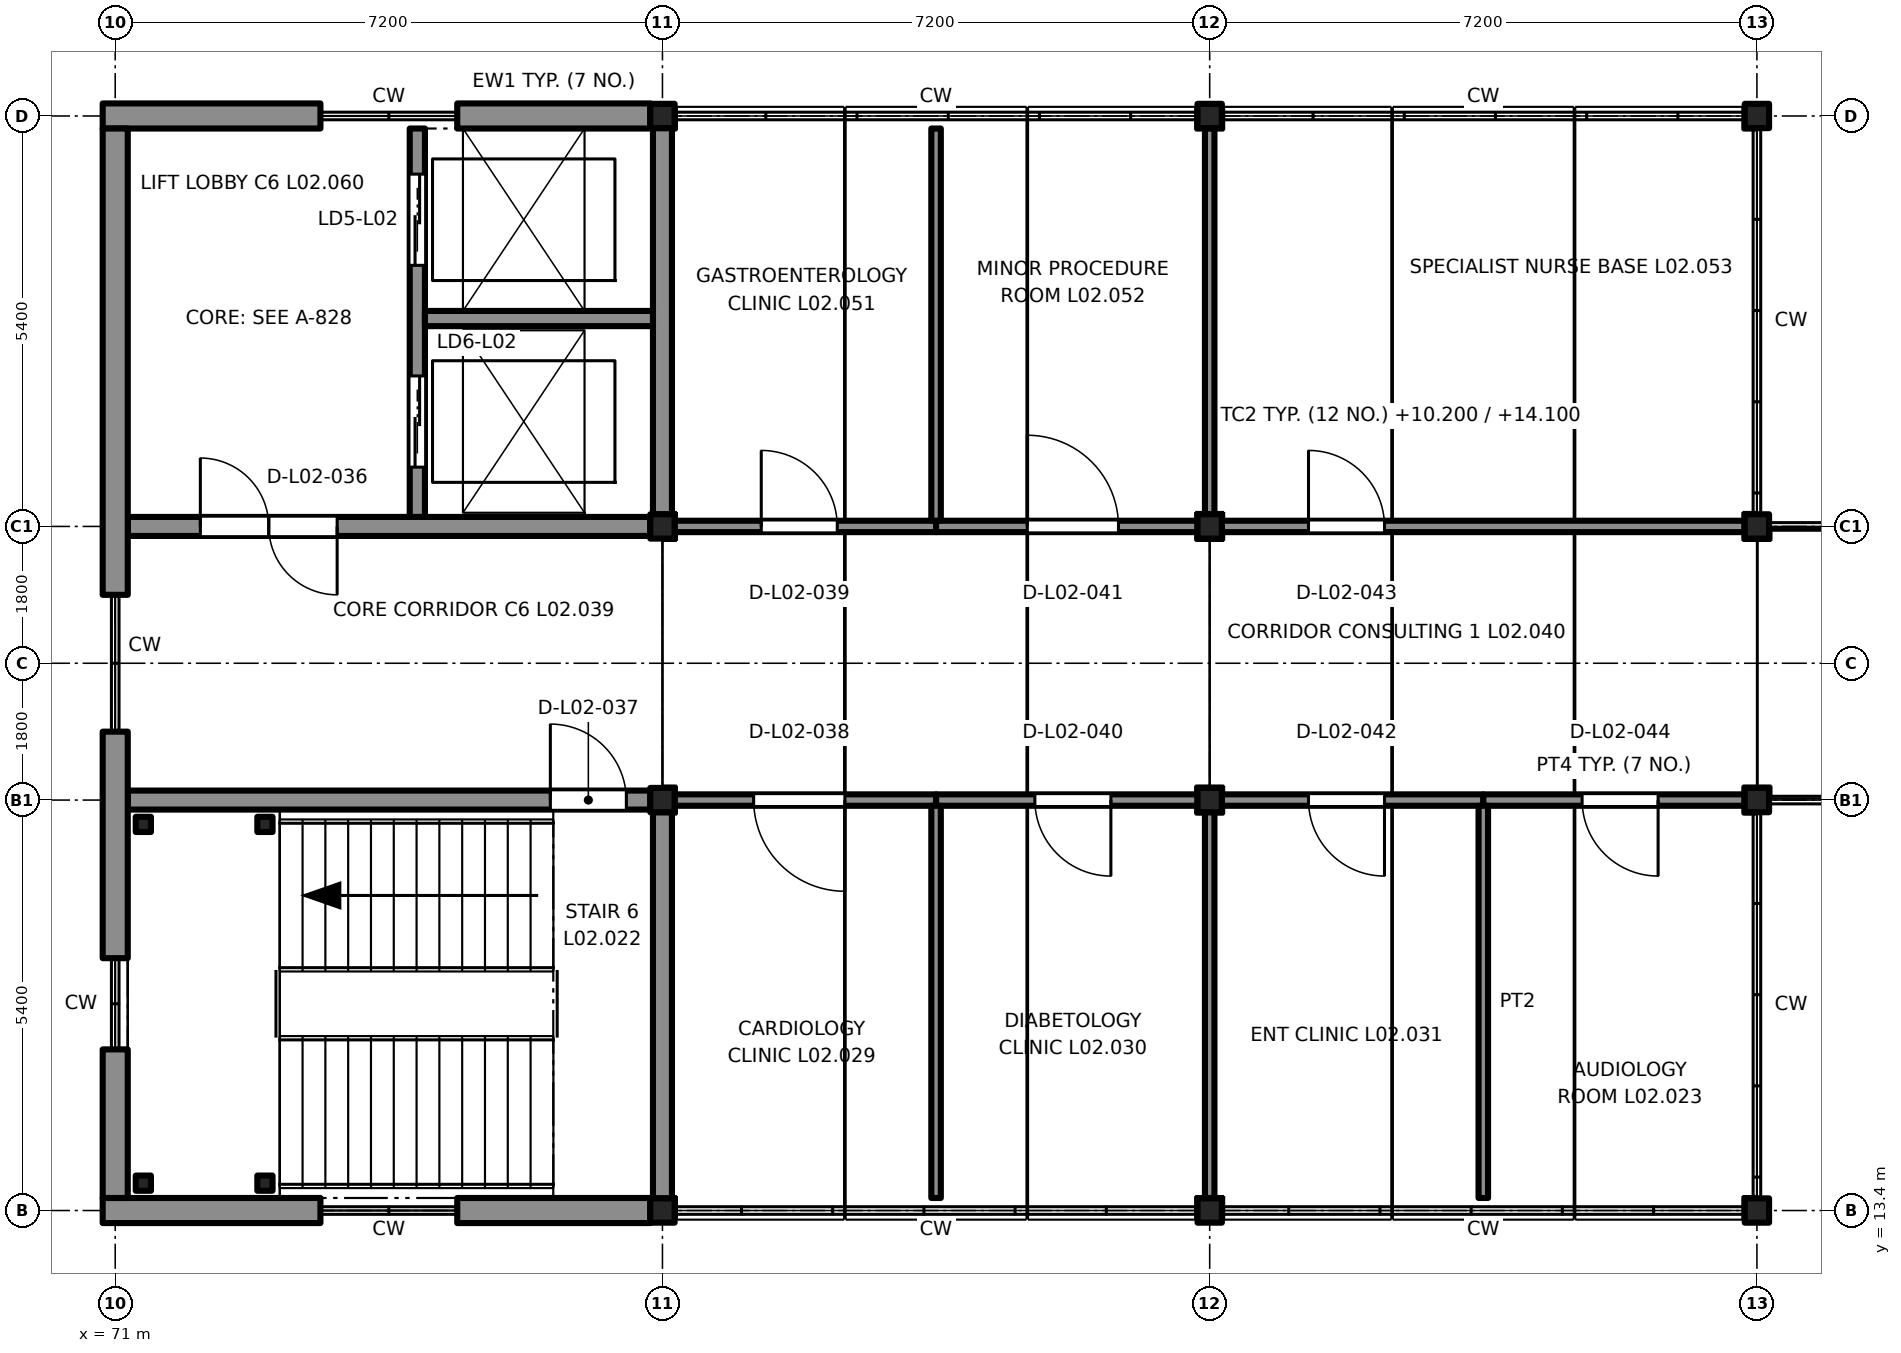
"""IFC4 building model, lengths in metres.
Left out: names, types, materials, properties, quantities, classifications, styles, units other than length and angle.
Written with IfcOpenShell. Run it as: python <this file> out.ifc"""

import sys

from ifc_helpers import new_model, si_unit, direction, frame, frame_2d, origin, origin_2d, place, context, subcontext, project, spatial, rectangle, extrude, element, fill, save


model = new_model("IFC4")
c1 = context("Model", 3, precision=1e-05, world=origin(), true_north=direction((0.0, 1.0)))
c2 = subcontext(c1, "Body", "Model", "MODEL_VIEW")
j1 = project(units=[si_unit("LENGTHUNIT", "METRE"), si_unit("PLANEANGLEUNIT", "RADIAN")], contexts=[c1])
p1 = place(None, origin())
s1 = spatial("IfcSite", under=j1, at=p1, CompositionType="ELEMENT")
p2 = place(p1, origin())
s2 = spatial("IfcBuilding", under=s1, at=p2, CompositionType="ELEMENT")
p3 = place(p2, frame((0.0, 0.0, 10.2)))
s3 = spatial("IfcBuildingStorey", under=s2, at=p3, CompositionType="ELEMENT", Elevation=10.2)
for number, where, z_axis, x_axis in (
    (1, (78.2, 13.4, 0.0), (0.0, 0.0, 1.0), (1.0, 0.0, 0.0)),
    (2, (78.2, 18.8, 0.0), (0.0, 0.0, 1.0), (1.0, 0.0, 0.0)),
    (3, (78.2, 22.4, 0.0), (0.0, 0.0, 1.0), (1.0, 0.0, 0.0)),
    (4, (78.2, 27.8, 0.0), (0.0, 0.0, 1.0), (1.0, 0.0, 0.0)),
    (5, (85.4, 13.4, 0.0), (0.0, 0.0, 1.0), (1.0, 0.0, 0.0)),
    (6, (85.4, 18.8, 0.0), (0.0, 0.0, 1.0), (1.0, 0.0, 0.0)),
    (7, (85.4, 22.4, 0.0), (0.0, 0.0, 1.0), (1.0, 0.0, 0.0)),
    (8, (85.4, 27.8, 0.0), (0.0, 0.0, 1.0), (1.0, 0.0, 0.0)),
    (9, (92.6, 13.4, 0.0), (0.0, 0.0, 1.0), (1.0, 0.0, 0.0)),
    (10, (92.6, 18.8, 0.0), (0.0, 0.0, 1.0), (1.0, 0.0, 0.0)),
    (11, (92.6, 22.4, 0.0), (0.0, 0.0, 1.0), (1.0, 0.0, 0.0)),
    (12, (92.6, 27.8, 0.0), (0.0, 0.0, 1.0), (1.0, 0.0, 0.0)),
):
    element("IfcColumn", number, at=place(p3, frame(where, z_axis=z_axis, x_axis=x_axis)), inside=s3, PredefinedType="COLUMN", context=c2, shape_type="SweptSolid", body=[
        extrude(rectangle(XDim=0.32, YDim=0.32, at=origin_2d()), origin(), (0.0, 0.0, 1.0), 3.9),
    ])
p4 = place(p3, frame((71.165, 18.8, 0.0), z_axis=(0.0, 0.0, 1.0), x_axis=(1.0, 0.0, 0.0)))
e13 = element("IfcWall", 13, at=p4, inside=s3, PredefinedType="SHEAR", context=c2, shape_type="SweptSolid", body=[
    extrude(rectangle(XDim=6.875, YDim=0.25, at=frame_2d((3.438, 0.0))), origin(), (0.0, 0.0, 1.0), 3.65),
])
p5 = place(p4, frame((5.56, 0.0, 0.0)))
e14 = element("IfcOpeningElement", 14, at=p5, cuts=e13, PredefinedType="OPENING", context=c2, shape_type="SweptSolid", body=[
    extrude(rectangle(XDim=1.0, YDim=2.1, at=frame_2d((0.5, 1.05))), frame((0.0, 0.135, 0.0), z_axis=(0.0, -1.0, 0.0), x_axis=(1.0, 0.0, 0.0)), (0.0, 0.0, 1.0), 0.27),
])
p6 = place(p3, frame((78.2, 13.56, 0.0), z_axis=(0.0, 0.0, 1.0), x_axis=(0.0, 1.0, 0.0)))
e15 = element("IfcWall", 15, at=p6, inside=s3, PredefinedType="SHEAR", context=c2, shape_type="SweptSolid", body=[
    extrude(rectangle(XDim=5.08, YDim=0.25, at=frame_2d((2.54, 0.0))), origin(), (0.0, 0.0, 1.0), 3.65),
])
p7 = place(p3, frame((71.165, 22.4, 0.0), z_axis=(0.0, 0.0, 1.0), x_axis=(1.0, 0.0, 0.0)))
e16 = element("IfcWall", 16, at=p7, inside=s3, PredefinedType="SHEAR", context=c2, shape_type="SweptSolid", body=[
    extrude(rectangle(XDim=6.875, YDim=0.25, at=frame_2d((3.438, 0.0))), origin(), (0.0, 0.0, 1.0), 3.65),
])
p8 = place(p7, frame((0.955, 0.0, 0.0)))
e17 = element("IfcOpeningElement", 17, at=p8, cuts=e16, PredefinedType="OPENING", context=c2, shape_type="SweptSolid", body=[
    extrude(rectangle(XDim=1.8, YDim=2.1, at=frame_2d((0.9, 1.05))), frame((0.0, 0.135, 0.0), z_axis=(0.0, -1.0, 0.0), x_axis=(1.0, 0.0, 0.0)), (0.0, 0.0, 1.0), 0.27),
])
p9 = place(p3, frame((78.2, 22.56, 0.0), z_axis=(0.0, 0.0, 1.0), x_axis=(0.0, 1.0, 0.0)))
e18 = element("IfcWall", 18, at=p9, inside=s3, PredefinedType="SHEAR", context=c2, shape_type="SweptSolid", body=[
    extrude(rectangle(XDim=5.08, YDim=0.25, at=frame_2d((2.54, 0.0))), origin(), (0.0, 0.0, 1.0), 3.65),
])
p10 = place(p3, frame((74.975, 22.525, 0.0), z_axis=(0.0, 0.0, 1.0), x_axis=(0.0, 1.0, 0.0)))
e19 = element("IfcWall", 19, at=p10, inside=s3, PredefinedType="SHEAR", context=c2, shape_type="SweptSolid", body=[
    extrude(rectangle(XDim=5.11, YDim=0.2, at=frame_2d((2.555, 0.0))), origin(), (0.0, 0.0, 1.0), 3.65),
])
p11 = place(p10, frame((3.31, 0.0, 0.0)))
e20 = element("IfcOpeningElement", 20, at=p11, cuts=e19, PredefinedType="OPENING", context=c2, shape_type="SweptSolid", body=[
    extrude(rectangle(XDim=1.2, YDim=2.1, at=frame_2d((0.6, 1.05))), frame((0.0, 0.11, 0.0), z_axis=(0.0, -1.0, 0.0), x_axis=(1.0, 0.0, 0.0)), (0.0, 0.0, 1.0), 0.22),
])
p12 = place(p10, frame((0.655, 0.0, 0.0)))
e21 = element("IfcOpeningElement", 21, at=p12, cuts=e19, PredefinedType="OPENING", context=c2, shape_type="SweptSolid", body=[
    extrude(rectangle(XDim=1.2, YDim=2.1, at=frame_2d((0.6, 1.05))), frame((0.0, 0.11, 0.0), z_axis=(0.0, -1.0, 0.0), x_axis=(1.0, 0.0, 0.0)), (0.0, 0.0, 1.0), 0.22),
])
p13 = place(p3, frame((78.075, 25.135, 0.0), z_axis=(0.0, 0.0, 1.0), x_axis=(-1.0, 0.0, 0.0)))
e22 = element("IfcWall", 22, at=p13, inside=s3, PredefinedType="SHEAR", context=c2, shape_type="SweptSolid", body=[
    extrude(rectangle(XDim=3.0, YDim=0.2, at=frame_2d((1.5, 0.0))), origin(), (0.0, 0.0, 1.0), 3.65),
])
for number, where, z_axis, x_axis in (
    (23, (71.37, 13.76, 0.0), (0.0, 0.0, 1.0), (1.0, 0.0, 0.0)),
    (24, (71.37, 18.48, 0.0), (0.0, 0.0, 1.0), (1.0, 0.0, 0.0)),
    (25, (72.97, 13.76, 0.0), (0.0, 0.0, 1.0), (1.0, 0.0, 0.0)),
    (26, (72.97, 18.48, 0.0), (0.0, 0.0, 1.0), (1.0, 0.0, 0.0)),
):
    element("IfcColumn", number, at=place(p3, frame(where, z_axis=z_axis, x_axis=x_axis)), inside=s3, PredefinedType="COLUMN", context=c2, shape_type="SweptSolid", body=[
        extrude(rectangle(XDim=0.2, YDim=0.2, at=origin_2d()), origin(), (0.0, 0.0, 1.0), 3.9),
    ])
p14 = place(p3, frame((73.7, 13.4, 0.0), z_axis=(0.0, 0.0, 1.0), x_axis=(-1.0, 0.0, 0.0)))
e27 = element("IfcWall", 27, at=p14, inside=s3, PredefinedType="SOLIDWALL", context=c2, shape_type="SweptSolid", body=[
    extrude(rectangle(XDim=2.865, YDim=0.33, at=frame_2d((1.433, 0.0))), origin(), (0.0, 0.0, 1.0), 3.22),
])
p15 = place(p3, frame((78.04, 13.4, 0.0), z_axis=(0.0, 0.0, 1.0), x_axis=(-1.0, 0.0, 0.0)))
e28 = element("IfcWall", 28, at=p15, inside=s3, PredefinedType="SOLIDWALL", context=c2, shape_type="SweptSolid", body=[
    extrude(rectangle(XDim=2.54, YDim=0.33, at=frame_2d((1.27, 0.0))), origin(), (0.0, 0.0, 1.0), 3.22),
])
p16 = place(p3, frame((70.835, 27.8, 0.0), z_axis=(0.0, 0.0, 1.0), x_axis=(1.0, 0.0, 0.0)))
e29 = element("IfcWall", 29, at=p16, inside=s3, PredefinedType="SOLIDWALL", context=c2, shape_type="SweptSolid", body=[
    extrude(rectangle(XDim=2.865, YDim=0.33, at=frame_2d((1.433, 0.0))), origin(), (0.0, 0.0, 1.0), 3.22),
])
p17 = place(p3, frame((75.5, 27.8, 0.0), z_axis=(0.0, 0.0, 1.0), x_axis=(1.0, 0.0, 0.0)))
e30 = element("IfcWall", 30, at=p17, inside=s3, PredefinedType="SOLIDWALL", context=c2, shape_type="SweptSolid", body=[
    extrude(rectangle(XDim=2.54, YDim=0.33, at=frame_2d((1.27, 0.0))), origin(), (0.0, 0.0, 1.0), 3.22),
])
p18 = place(p3, frame((71.0, 13.565, 0.0), z_axis=(0.0, 0.0, 1.0), x_axis=(0.0, 1.0, 0.0)))
e31 = element("IfcWall", 31, at=p18, inside=s3, PredefinedType="SOLIDWALL", context=c2, shape_type="SweptSolid", body=[
    extrude(rectangle(XDim=1.955, YDim=0.33, at=frame_2d((0.978, 0.0))), origin(), (0.0, 0.0, 1.0), 3.2),
])
p19 = place(p3, frame((71.0, 16.72, 0.0), z_axis=(0.0, 0.0, 1.0), x_axis=(0.0, 1.0, 0.0)))
e32 = element("IfcWall", 32, at=p19, inside=s3, PredefinedType="SOLIDWALL", context=c2, shape_type="SweptSolid", body=[
    extrude(rectangle(XDim=2.98, YDim=0.33, at=frame_2d((1.49, 0.0))), origin(), (0.0, 0.0, 1.0), 3.2),
])
p20 = place(p3, frame((71.0, 21.5, 0.0), z_axis=(0.0, 0.0, 1.0), x_axis=(0.0, 1.0, 0.0)))
e33 = element("IfcWall", 33, at=p20, inside=s3, PredefinedType="SOLIDWALL", context=c2, shape_type="SweptSolid", body=[
    extrude(rectangle(XDim=6.135, YDim=0.33, at=frame_2d((3.067, 0.0))), origin(), (0.0, 0.0, 1.0), 3.2),
])
p21 = place(p3, frame((81.8, 18.8, 0.0), z_axis=(0.0, 0.0, 1.0), x_axis=(-1.0, 0.0, 0.0)))
e34 = element("IfcWall", 34, at=p21, inside=s3, PredefinedType="PARTITIONING", context=c2, shape_type="SweptSolid", body=[
    extrude(rectangle(XDim=3.44, YDim=0.15, at=frame_2d((1.72, 0.0))), origin(), (0.0, 0.0, 1.0), 3.22),
])
p22 = place(p21, frame((1.2, 0.0, 0.0)))
e35 = element("IfcOpeningElement", 35, at=p22, cuts=e34, PredefinedType="OPENING", context=c2, shape_type="SweptSolid", body=[
    extrude(rectangle(XDim=1.2, YDim=2.1, at=frame_2d((0.6, 1.05))), frame((0.0, 0.085, 0.0), z_axis=(0.0, -1.0, 0.0), x_axis=(1.0, 0.0, 0.0)), (0.0, 0.0, 1.0), 0.17),
])
p23 = place(p3, frame((85.24, 18.8, 0.0), z_axis=(0.0, 0.0, 1.0), x_axis=(-1.0, 0.0, 0.0)))
e36 = element("IfcWall", 36, at=p23, inside=s3, PredefinedType="PARTITIONING", context=c2, shape_type="SweptSolid", body=[
    extrude(rectangle(XDim=3.44, YDim=0.15, at=frame_2d((1.72, 0.0))), origin(), (0.0, 0.0, 1.0), 3.22),
])
p24 = place(p23, frame((1.14, 0.0, 0.0)))
e37 = element("IfcOpeningElement", 37, at=p24, cuts=e36, PredefinedType="OPENING", context=c2, shape_type="SweptSolid", body=[
    extrude(rectangle(XDim=1.0, YDim=2.1, at=frame_2d((0.5, 1.05))), frame((0.0, 0.085, 0.0), z_axis=(0.0, -1.0, 0.0), x_axis=(1.0, 0.0, 0.0)), (0.0, 0.0, 1.0), 0.17),
])
p25 = place(p3, frame((81.8, 13.565, 0.0), z_axis=(0.0, 0.0, 1.0), x_axis=(0.0, 1.0, 0.0)))
e38 = element("IfcWall", 38, at=p25, inside=s3, PredefinedType="PARTITIONING", context=c2, shape_type="SweptSolid", body=[
    extrude(rectangle(XDim=5.16, YDim=0.125, at=frame_2d((2.58, 0.0))), origin(), (0.0, 0.0, 1.0), 3.38),
])
p26 = place(p3, frame((89.0, 18.8, 0.0), z_axis=(0.0, 0.0, 1.0), x_axis=(-1.0, 0.0, 0.0)))
e39 = element("IfcWall", 39, at=p26, inside=s3, PredefinedType="PARTITIONING", context=c2, shape_type="SweptSolid", body=[
    extrude(rectangle(XDim=3.44, YDim=0.15, at=frame_2d((1.72, 0.0))), origin(), (0.0, 0.0, 1.0), 3.22),
])
p27 = place(p26, frame((1.3, 0.0, 0.0)))
e40 = element("IfcOpeningElement", 40, at=p27, cuts=e39, PredefinedType="OPENING", context=c2, shape_type="SweptSolid", body=[
    extrude(rectangle(XDim=1.0, YDim=2.1, at=frame_2d((0.5, 1.05))), frame((0.0, 0.085, 0.0), z_axis=(0.0, -1.0, 0.0), x_axis=(1.0, 0.0, 0.0)), (0.0, 0.0, 1.0), 0.17),
])
p28 = place(p3, frame((85.4, 13.565, 0.0), z_axis=(0.0, 0.0, 1.0), x_axis=(0.0, 1.0, 0.0)))
e41 = element("IfcWall", 41, at=p28, inside=s3, PredefinedType="PARTITIONING", context=c2, shape_type="SweptSolid", body=[
    extrude(rectangle(XDim=5.075, YDim=0.125, at=frame_2d((2.538, 0.0))), origin(), (0.0, 0.0, 1.0), 3.38),
])
p29 = place(p3, frame((92.435, 18.8, 0.0), z_axis=(0.0, 0.0, 1.0), x_axis=(-1.0, 0.0, 0.0)))
e42 = element("IfcWall", 42, at=p29, inside=s3, PredefinedType="PARTITIONING", context=c2, shape_type="SweptSolid", body=[
    extrude(rectangle(XDim=3.435, YDim=0.15, at=frame_2d((1.718, 0.0))), origin(), (0.0, 0.0, 1.0), 3.22),
])
p30 = place(p29, frame((1.135, 0.0, 0.0)))
e43 = element("IfcOpeningElement", 43, at=p30, cuts=e42, PredefinedType="OPENING", context=c2, shape_type="SweptSolid", body=[
    extrude(rectangle(XDim=1.0, YDim=2.1, at=frame_2d((0.5, 1.05))), frame((0.0, 0.085, 0.0), z_axis=(0.0, -1.0, 0.0), x_axis=(1.0, 0.0, 0.0)), (0.0, 0.0, 1.0), 0.17),
])
p31 = place(p3, frame((89.0, 13.565, 0.0), z_axis=(0.0, 0.0, 1.0), x_axis=(0.0, 1.0, 0.0)))
e44 = element("IfcWall", 44, at=p31, inside=s3, PredefinedType="PARTITIONING", context=c2, shape_type="SweptSolid", body=[
    extrude(rectangle(XDim=5.16, YDim=0.125, at=frame_2d((2.58, 0.0))), origin(), (0.0, 0.0, 1.0), 3.38),
])
p32 = place(p3, frame((78.36, 22.4, 0.0), z_axis=(0.0, 0.0, 1.0), x_axis=(1.0, 0.0, 0.0)))
e45 = element("IfcWall", 45, at=p32, inside=s3, PredefinedType="PARTITIONING", context=c2, shape_type="SweptSolid", body=[
    extrude(rectangle(XDim=3.44, YDim=0.15, at=frame_2d((1.72, 0.0))), origin(), (0.0, 0.0, 1.0), 3.22),
])
p33 = place(p32, frame((1.14, 0.0, 0.0)))
e46 = element("IfcOpeningElement", 46, at=p33, cuts=e45, PredefinedType="OPENING", context=c2, shape_type="SweptSolid", body=[
    extrude(rectangle(XDim=1.0, YDim=2.1, at=frame_2d((0.5, 1.05))), frame((0.0, 0.085, 0.0), z_axis=(0.0, -1.0, 0.0), x_axis=(1.0, 0.0, 0.0)), (0.0, 0.0, 1.0), 0.17),
])
p34 = place(p3, frame((81.8, 22.4, 0.0), z_axis=(0.0, 0.0, 1.0), x_axis=(1.0, 0.0, 0.0)))
e47 = element("IfcWall", 47, at=p34, inside=s3, PredefinedType="PARTITIONING", context=c2, shape_type="SweptSolid", body=[
    extrude(rectangle(XDim=3.44, YDim=0.15, at=frame_2d((1.72, 0.0))), origin(), (0.0, 0.0, 1.0), 3.22),
])
p35 = place(p34, frame((1.2, 0.0, 0.0)))
e48 = element("IfcOpeningElement", 48, at=p35, cuts=e47, PredefinedType="OPENING", context=c2, shape_type="SweptSolid", body=[
    extrude(rectangle(XDim=1.2, YDim=2.1, at=frame_2d((0.6, 1.05))), frame((0.0, 0.085, 0.0), z_axis=(0.0, -1.0, 0.0), x_axis=(1.0, 0.0, 0.0)), (0.0, 0.0, 1.0), 0.17),
])
p36 = place(p3, frame((81.8, 27.635, 0.0), z_axis=(0.0, 0.0, 1.0), x_axis=(0.0, -1.0, 0.0)))
e49 = element("IfcWall", 49, at=p36, inside=s3, PredefinedType="PARTITIONING", context=c2, shape_type="SweptSolid", body=[
    extrude(rectangle(XDim=5.16, YDim=0.125, at=frame_2d((2.58, 0.0))), origin(), (0.0, 0.0, 1.0), 3.38),
])
p37 = place(p3, frame((85.56, 22.4, 0.0), z_axis=(0.0, 0.0, 1.0), x_axis=(1.0, 0.0, 0.0)))
e50 = element("IfcWall", 50, at=p37, inside=s3, PredefinedType="PARTITIONING", context=c2, shape_type="SweptSolid", body=[
    extrude(rectangle(XDim=6.875, YDim=0.15, at=frame_2d((3.438, 0.0))), origin(), (0.0, 0.0, 1.0), 3.22),
])
p38 = place(p37, frame((1.14, 0.0, 0.0)))
e51 = element("IfcOpeningElement", 51, at=p38, cuts=e50, PredefinedType="OPENING", context=c2, shape_type="SweptSolid", body=[
    extrude(rectangle(XDim=1.0, YDim=2.1, at=frame_2d((0.5, 1.05))), frame((0.0, 0.085, 0.0), z_axis=(0.0, -1.0, 0.0), x_axis=(1.0, 0.0, 0.0)), (0.0, 0.0, 1.0), 0.17),
])
p39 = place(p3, frame((85.4, 27.635, 0.0), z_axis=(0.0, 0.0, 1.0), x_axis=(0.0, -1.0, 0.0)))
e52 = element("IfcWall", 52, at=p39, inside=s3, PredefinedType="PARTITIONING", context=c2, shape_type="SweptSolid", body=[
    extrude(rectangle(XDim=5.075, YDim=0.125, at=frame_2d((2.538, 0.0))), origin(), (0.0, 0.0, 1.0), 3.38),
])
p40 = place(p5, origin())
e53 = element("IfcDoor", 53, at=p40, inside=s3, OperationType="SINGLE_SWING_RIGHT", PredefinedType="DOOR", context=c2, shape_type="SweptSolid", body=[
    extrude(rectangle(XDim=1.0, YDim=2.1, at=frame_2d((0.5, 1.05))), frame((0.0, 0.025, 0.0), z_axis=(0.0, -1.0, 0.0), x_axis=(1.0, 0.0, 0.0)), (0.0, 0.0, 1.0), 0.05),
])
fill(e14, e53)
p41 = place(p8, origin())
e54 = element("IfcDoor", 54, at=p41, inside=s3, OperationType="DOUBLE_DOOR_SINGLE_SWING", PredefinedType="DOOR", context=c2, shape_type="SweptSolid", body=[
    extrude(rectangle(XDim=1.8, YDim=2.1, at=frame_2d((0.9, 1.05))), frame((0.0, 0.025, 0.0), z_axis=(0.0, -1.0, 0.0), x_axis=(1.0, 0.0, 0.0)), (0.0, 0.0, 1.0), 0.05),
])
fill(e17, e54)
p42 = place(p11, origin())
e55 = element("IfcDoor", 55, at=p42, inside=s3, OperationType="DOUBLE_DOOR_SLIDING", PredefinedType="DOOR", context=c2, shape_type="SweptSolid", body=[
    extrude(rectangle(XDim=1.2, YDim=2.1, at=frame_2d((0.6, 1.05))), frame((0.0, 0.025, 0.0), z_axis=(0.0, -1.0, 0.0), x_axis=(1.0, 0.0, 0.0)), (0.0, 0.0, 1.0), 0.05),
])
fill(e20, e55)
p43 = place(p12, origin())
e56 = element("IfcDoor", 56, at=p43, inside=s3, OperationType="DOUBLE_DOOR_SLIDING", PredefinedType="DOOR", context=c2, shape_type="SweptSolid", body=[
    extrude(rectangle(XDim=1.2, YDim=2.1, at=frame_2d((0.6, 1.05))), frame((0.0, 0.025, 0.0), z_axis=(0.0, -1.0, 0.0), x_axis=(1.0, 0.0, 0.0)), (0.0, 0.0, 1.0), 0.05),
])
fill(e21, e56)
p44 = place(p22, origin())
e57 = element("IfcDoor", 57, at=p44, inside=s3, OperationType="SINGLE_SWING_RIGHT", PredefinedType="DOOR", context=c2, shape_type="SweptSolid", body=[
    extrude(rectangle(XDim=1.2, YDim=2.1, at=frame_2d((0.6, 1.05))), frame((0.0, 0.025, 0.0), z_axis=(0.0, -1.0, 0.0), x_axis=(1.0, 0.0, 0.0)), (0.0, 0.0, 1.0), 0.05),
])
fill(e35, e57)
p45 = place(p24, origin())
e58 = element("IfcDoor", 58, at=p45, inside=s3, OperationType="SINGLE_SWING_LEFT", PredefinedType="DOOR", context=c2, shape_type="SweptSolid", body=[
    extrude(rectangle(XDim=1.0, YDim=2.1, at=frame_2d((0.5, 1.05))), frame((0.0, 0.025, 0.0), z_axis=(0.0, -1.0, 0.0), x_axis=(1.0, 0.0, 0.0)), (0.0, 0.0, 1.0), 0.05),
])
fill(e37, e58)
p46 = place(p27, origin())
e59 = element("IfcDoor", 59, at=p46, inside=s3, OperationType="SINGLE_SWING_RIGHT", PredefinedType="DOOR", context=c2, shape_type="SweptSolid", body=[
    extrude(rectangle(XDim=1.0, YDim=2.1, at=frame_2d((0.5, 1.05))), frame((0.0, 0.025, 0.0), z_axis=(0.0, -1.0, 0.0), x_axis=(1.0, 0.0, 0.0)), (0.0, 0.0, 1.0), 0.05),
])
fill(e40, e59)
p47 = place(p30, origin())
e60 = element("IfcDoor", 60, at=p47, inside=s3, OperationType="SINGLE_SWING_LEFT", PredefinedType="DOOR", context=c2, shape_type="SweptSolid", body=[
    extrude(rectangle(XDim=1.0, YDim=2.1, at=frame_2d((0.5, 1.05))), frame((0.0, 0.025, 0.0), z_axis=(0.0, -1.0, 0.0), x_axis=(1.0, 0.0, 0.0)), (0.0, 0.0, 1.0), 0.05),
])
fill(e43, e60)
p48 = place(p33, origin())
e61 = element("IfcDoor", 61, at=p48, inside=s3, OperationType="SINGLE_SWING_LEFT", PredefinedType="DOOR", context=c2, shape_type="SweptSolid", body=[
    extrude(rectangle(XDim=1.0, YDim=2.1, at=frame_2d((0.5, 1.05))), frame((0.0, 0.025, 0.0), z_axis=(0.0, -1.0, 0.0), x_axis=(1.0, 0.0, 0.0)), (0.0, 0.0, 1.0), 0.05),
])
fill(e46, e61)
p49 = place(p35, origin())
e62 = element("IfcDoor", 62, at=p49, inside=s3, OperationType="SINGLE_SWING_RIGHT", PredefinedType="DOOR", context=c2, shape_type="SweptSolid", body=[
    extrude(rectangle(XDim=1.2, YDim=2.1, at=frame_2d((0.6, 1.05))), frame((0.0, 0.025, 0.0), z_axis=(0.0, -1.0, 0.0), x_axis=(1.0, 0.0, 0.0)), (0.0, 0.0, 1.0), 0.05),
])
fill(e48, e62)
p50 = place(p38, origin())
e63 = element("IfcDoor", 63, at=p50, inside=s3, OperationType="SINGLE_SWING_LEFT", PredefinedType="DOOR", context=c2, shape_type="SweptSolid", body=[
    extrude(rectangle(XDim=1.0, YDim=2.1, at=frame_2d((0.5, 1.05))), frame((0.0, 0.025, 0.0), z_axis=(0.0, -1.0, 0.0), x_axis=(1.0, 0.0, 0.0)), (0.0, 0.0, 1.0), 0.05),
])
fill(e51, e63)
save(model, sys.argv[1])
